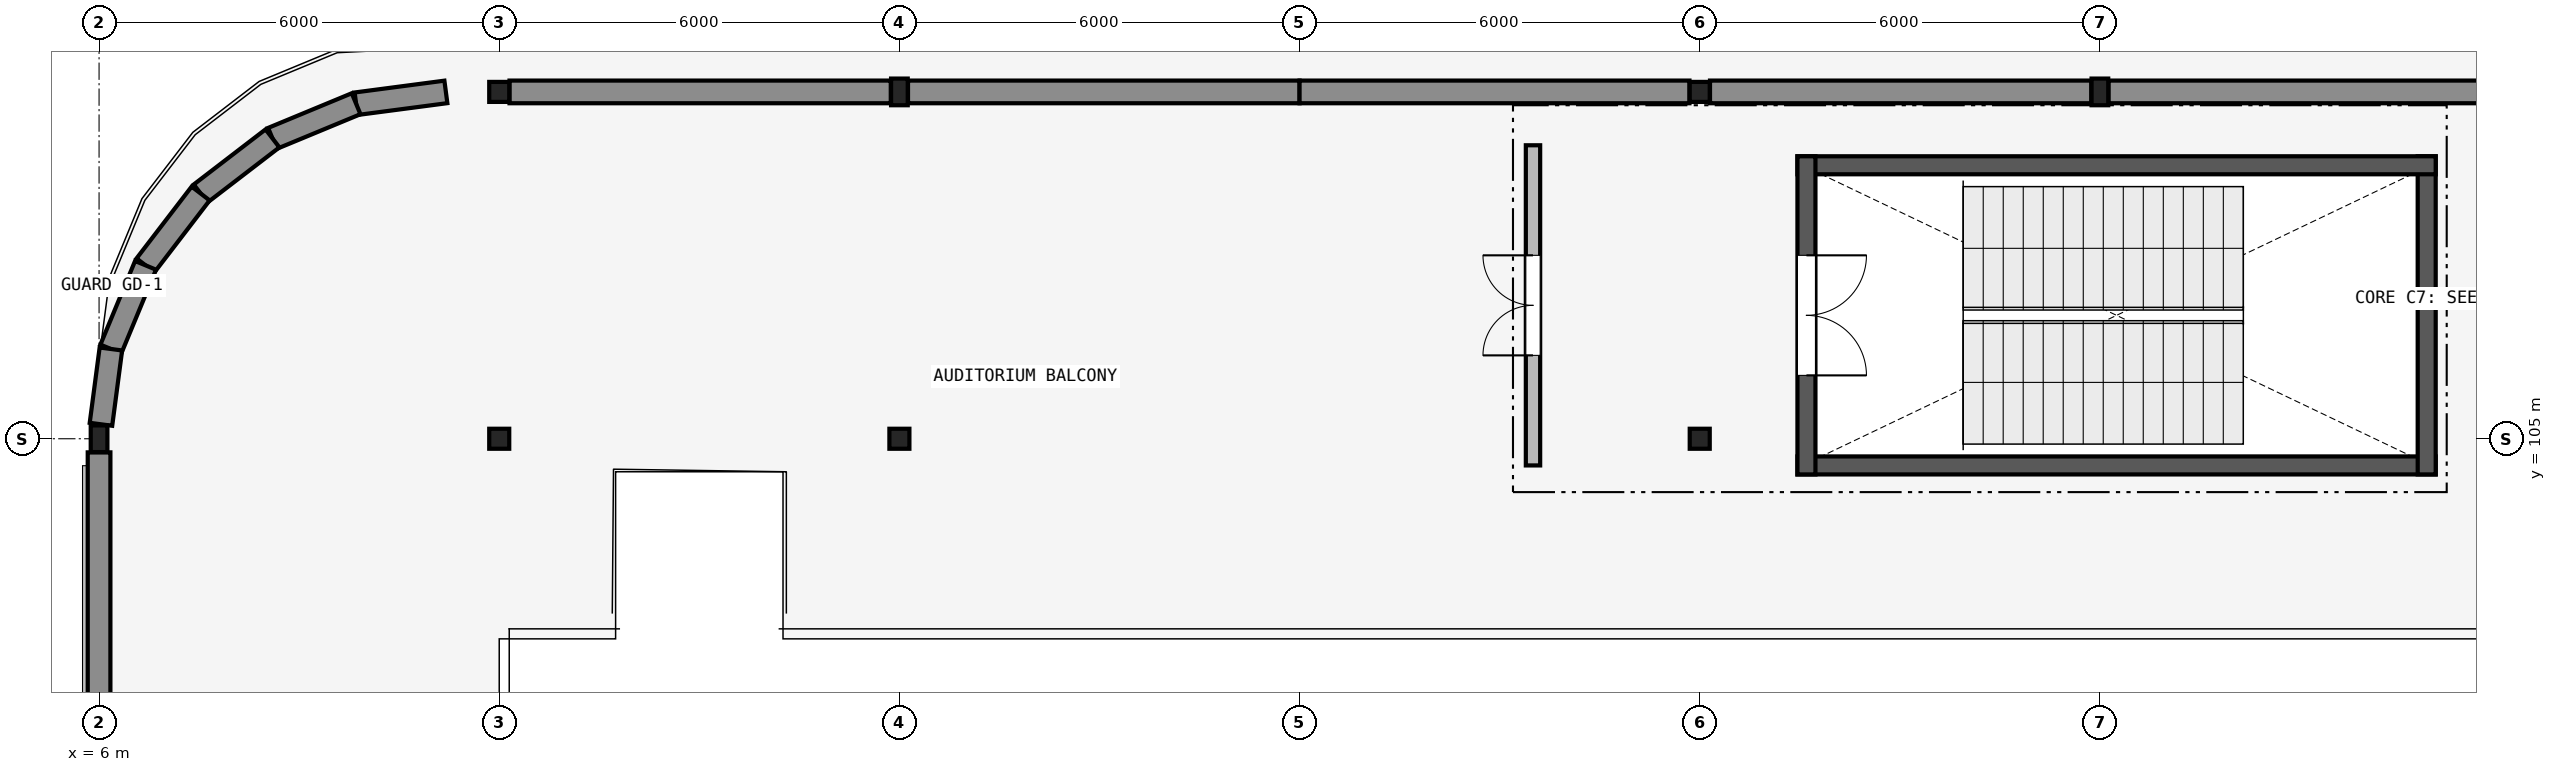
"""IFC4 building model, lengths in metres.
Left out: names, types, materials, properties, quantities, classifications, styles, units other than length and angle.
Written with IfcOpenShell. Run it as: python <this file> out.ifc"""

import sys

from ifc_helpers import new_model, si_unit, direction, frame, frame_2d, origin, origin_2d, place, context, subcontext, project, spatial, rectangle, hollow_rectangle, i_section, extrude, element, fill, save


model = new_model("IFC4")
c1 = context("Model", 3, precision=1e-05, world=origin(), true_north=direction((0.0, 1.0)))
c2 = subcontext(c1, "Body", "Model", "MODEL_VIEW")
j1 = project(units=[si_unit("LENGTHUNIT", "METRE"), si_unit("PLANEANGLEUNIT", "RADIAN")], contexts=[c1])
p1 = place(None, origin())
s1 = spatial("IfcSite", under=j1, at=p1, CompositionType="ELEMENT")
p2 = place(p1, origin())
s2 = spatial("IfcBuilding", under=s1, at=p2, CompositionType="ELEMENT")
p3 = place(p2, frame((0.0, 0.0, 4.8)))
s3 = spatial("IfcBuildingStorey", under=s2, at=p3, CompositionType="ELEMENT", Elevation=4.8)
p4 = place(p3, frame((6.0, 105.0, 0.0), z_axis=(0.0, 0.0, 1.0), x_axis=(1.0, 0.0, 0.0)))
e1 = element("IfcColumn", 1, at=p4, inside=s3, PredefinedType="COLUMN", context=c2, shape_type="SweptSolid", body=[
    extrude(i_section(OverallWidth=0.25, OverallDepth=0.4, WebThickness=0.01, FlangeThickness=0.013, FilletRadius=0.014, at=origin_2d()), origin(), (0.0, 0.0, 1.0), 4.5),
])
for number, where, z_axis, x_axis in (
    (2, (12.0, 105.0, 0.0), (0.0, 0.0, 1.0), (1.0, 0.0, 0.0)),
    (3, (12.0, 110.2, 0.0), (0.0, 0.0, 1.0), (1.0, 0.0, 0.0)),
    (4, (18.0, 105.0, 0.0), (0.0, 0.0, 1.0), (1.0, 0.0, 0.0)),
):
    element("IfcColumn", number, at=place(p3, frame(where, z_axis=z_axis, x_axis=x_axis)), inside=s3, PredefinedType="COLUMN", context=c2, shape_type="SweptSolid", body=[
        extrude(hollow_rectangle(XDim=0.3, YDim=0.3, WallThickness=0.016, InnerFilletRadius=0.016, OuterFilletRadius=0.032, at=origin_2d()), origin(), (0.0, 0.0, 1.0), 4.5),
    ])
p5 = place(p3, frame((18.0, 110.2, 0.0), z_axis=(0.0, 0.0, 1.0), x_axis=(1.0, 0.0, 0.0)))
e5 = element("IfcColumn", 5, at=p5, inside=s3, PredefinedType="COLUMN", context=c2, shape_type="SweptSolid", body=[
    extrude(i_section(OverallWidth=0.25, OverallDepth=0.4, WebThickness=0.01, FlangeThickness=0.013, FilletRadius=0.014, at=origin_2d()), origin(), (0.0, 0.0, 1.0), 4.5),
])
for number, where, z_axis, x_axis in (
    (6, (30.0, 105.0, 0.0), (0.0, 0.0, 1.0), (1.0, 0.0, 0.0)),
    (7, (30.0, 110.2, 0.0), (0.0, 0.0, 1.0), (1.0, 0.0, 0.0)),
):
    element("IfcColumn", number, at=place(p3, frame(where, z_axis=z_axis, x_axis=x_axis)), inside=s3, PredefinedType="COLUMN", context=c2, shape_type="SweptSolid", body=[
        extrude(hollow_rectangle(XDim=0.3, YDim=0.3, WallThickness=0.016, InnerFilletRadius=0.016, OuterFilletRadius=0.032, at=origin_2d()), origin(), (0.0, 0.0, 1.0), 4.5),
    ])
p6 = place(p3, frame((36.0, 110.2, 0.0), z_axis=(0.0, 0.0, 1.0), x_axis=(1.0, 0.0, 0.0)))
e8 = element("IfcColumn", 8, at=p6, inside=s3, PredefinedType="COLUMN", context=c2, shape_type="SweptSolid", body=[
    extrude(i_section(OverallWidth=0.25, OverallDepth=0.4, WebThickness=0.01, FlangeThickness=0.013, FilletRadius=0.014, at=origin_2d()), origin(), (0.0, 0.0, 1.0), 4.5),
])
p7 = place(p3, frame((6.0, 99.154, 0.0), z_axis=(0.0, 0.0, 1.0), x_axis=(0.0, 1.0, 0.0)))
e9 = element("IfcWall", 9, at=p7, inside=s3, PredefinedType="SOLIDWALL", context=c2, shape_type="SweptSolid", body=[
    extrude(rectangle(XDim=5.642, YDim=0.34, at=frame_2d((2.821, 0.0))), origin(), (0.0, 0.0, 1.0), 3.64),
])
p8 = place(p3, frame((12.154, 110.2, 0.0), z_axis=(0.0, 0.0, 1.0), x_axis=(1.0, 0.0, 0.0)))
e10 = element("IfcWall", 10, at=p8, inside=s3, PredefinedType="SOLIDWALL", context=c2, shape_type="SweptSolid", body=[
    extrude(rectangle(XDim=5.717, YDim=0.34, at=frame_2d((2.858, 0.0))), origin(), (0.0, 0.0, 1.0), 3.39),
])
p9 = place(p3, frame((18.129, 110.2, 0.0), z_axis=(0.0, 0.0, 1.0), x_axis=(1.0, 0.0, 0.0)))
e11 = element("IfcWall", 11, at=p9, inside=s3, PredefinedType="SOLIDWALL", context=c2, shape_type="SweptSolid", body=[
    extrude(rectangle(XDim=5.871, YDim=0.34, at=frame_2d((2.936, 0.0))), origin(), (0.0, 0.0, 1.0), 3.39),
])
p10 = place(p3, frame((24.0, 110.2, 0.0), z_axis=(0.0, 0.0, 1.0), x_axis=(1.0, 0.0, 0.0)))
e12 = element("IfcWall", 12, at=p10, inside=s3, PredefinedType="SOLIDWALL", context=c2, shape_type="SweptSolid", body=[
    extrude(rectangle(XDim=5.846, YDim=0.34, at=frame_2d((2.923, 0.0))), origin(), (0.0, 0.0, 1.0), 3.39),
])
p11 = place(p3, frame((30.154, 110.2, 0.0), z_axis=(0.0, 0.0, 1.0), x_axis=(1.0, 0.0, 0.0)))
e13 = element("IfcWall", 13, at=p11, inside=s3, PredefinedType="SOLIDWALL", context=c2, shape_type="SweptSolid", body=[
    extrude(rectangle(XDim=5.717, YDim=0.34, at=frame_2d((2.858, 0.0))), origin(), (0.0, 0.0, 1.0), 3.39),
])
p12 = place(p3, frame((36.129, 110.2, 0.0), z_axis=(0.0, 0.0, 1.0), x_axis=(1.0, 0.0, 0.0)))
e14 = element("IfcWall", 14, at=p12, inside=s3, PredefinedType="SOLIDWALL", context=c2, shape_type="SweptSolid", body=[
    extrude(rectangle(XDim=5.717, YDim=0.34, at=frame_2d((2.858, 0.0))), origin(), (0.0, 0.0, 1.0), 3.84),
])
p13 = place(p3, frame((11.2, 110.2, 0.0), z_axis=(0.0, 0.0, 1.0), x_axis=(-0.991440211328, -0.130561507967, 0.0)))
e15 = element("IfcWall", 15, at=p13, inside=s3, PredefinedType="SOLIDWALL", context=c2, shape_type="SweptSolid", body=[
    extrude(rectangle(XDim=1.358, YDim=0.34, at=frame_2d((0.679, 0.0))), origin(), (0.0, 0.0, 1.0), 4.195),
])
p14 = place(p3, frame((9.854, 110.023, 0.0), z_axis=(0.0, 0.0, 1.0), x_axis=(-0.923905024937, -0.382621882407, 0.0)))
e16 = element("IfcWall", 16, at=p14, inside=s3, PredefinedType="SOLIDWALL", context=c2, shape_type="SweptSolid", body=[
    extrude(rectangle(XDim=1.357, YDim=0.34, at=frame_2d((0.679, 0.0))), origin(), (0.0, 0.0, 1.0), 4.195),
])
p15 = place(p3, frame((8.6, 109.503, 0.0), z_axis=(0.0, 0.0, 1.0), x_axis=(-0.793392131727, -0.60871087169, 0.0)))
e17 = element("IfcWall", 17, at=p15, inside=s3, PredefinedType="SOLIDWALL", context=c2, shape_type="SweptSolid", body=[
    extrude(rectangle(XDim=1.358, YDim=0.34, at=frame_2d((0.679, 0.0))), origin(), (0.0, 0.0, 1.0), 4.195),
])
for number, where, z_axis, x_axis in (
    (18, (7.523, 108.677, 0.0), (0.0, 0.0, 1.0), (-0.609, -0.793, 0.0)),
    (19, (6.697, 107.6, 0.0), (0.0, 0.0, 1.0), (-0.383, -0.924, 0.0)),
):
    element("IfcWall", number, at=place(p3, frame(where, z_axis=z_axis, x_axis=x_axis)), inside=s3, PredefinedType="SOLIDWALL", context=c2, shape_type="SweptSolid", body=[
        extrude(rectangle(XDim=1.357, YDim=0.34, at=frame_2d((0.679, 0.0))), origin(), (0.0, 0.0, 1.0), 4.195),
    ])
p16 = place(p3, frame((6.177, 106.346, 0.0), z_axis=(0.0, 0.0, 1.0), x_axis=(-0.130548780406, -0.991441887321, 0.0)))
e20 = element("IfcWall", 20, at=p16, inside=s3, PredefinedType="SOLIDWALL", context=c2, shape_type="SweptSolid", body=[
    extrude(rectangle(XDim=1.139, YDim=0.34, at=frame_2d((0.569, 0.0))), origin(), (0.0, 0.0, 1.0), 3.64),
])
p17 = place(p3, frame((31.465, 104.6, 0.0), z_axis=(0.0, 0.0, 1.0), x_axis=(1.0, 0.0, 0.0)))
e21 = element("IfcWall", 21, at=p17, inside=s3, PredefinedType="SHEAR", context=c2, shape_type="SweptSolid", body=[
    extrude(rectangle(XDim=9.57, YDim=0.27, at=frame_2d((4.785, 0.0))), origin(), (0.0, 0.0, 1.0), 4.36),
])
p18 = place(p3, frame((40.9, 104.465, 0.0), z_axis=(0.0, 0.0, 1.0), x_axis=(0.0, 1.0, 0.0)))
e22 = element("IfcWall", 22, at=p18, inside=s3, PredefinedType="SHEAR", context=c2, shape_type="SweptSolid", body=[
    extrude(rectangle(XDim=4.77, YDim=0.27, at=frame_2d((2.385, 0.0))), origin(), (0.0, 0.0, 1.0), 4.36),
])
p19 = place(p3, frame((41.035, 109.1, 0.0), z_axis=(0.0, 0.0, 1.0), x_axis=(-1.0, 0.0, 0.0)))
e23 = element("IfcWall", 23, at=p19, inside=s3, PredefinedType="SHEAR", context=c2, shape_type="SweptSolid", body=[
    extrude(rectangle(XDim=9.57, YDim=0.27, at=frame_2d((4.785, 0.0))), origin(), (0.0, 0.0, 1.0), 4.36),
])
p20 = place(p3, frame((31.6, 109.235, 0.0), z_axis=(0.0, 0.0, 1.0), x_axis=(0.0, -1.0, 0.0)))
e24 = element("IfcWall", 24, at=p20, inside=s3, PredefinedType="SHEAR", context=c2, shape_type="SweptSolid", body=[
    extrude(rectangle(XDim=4.77, YDim=0.27, at=frame_2d((2.385, 0.0))), origin(), (0.0, 0.0, 1.0), 4.36),
])
p21 = place(p20, frame((1.485, 0.0, 0.0)))
e25 = element("IfcOpeningElement", 25, at=p21, cuts=e24, PredefinedType="OPENING", context=c2, shape_type="SweptSolid", body=[
    extrude(rectangle(XDim=1.8, YDim=2.2, at=frame_2d((0.9, 1.1))), frame((0.0, 0.145, 0.0), z_axis=(0.0, -1.0, 0.0), x_axis=(1.0, 0.0, 0.0)), (0.0, 0.0, 1.0), 0.29),
])
p22 = place(p3, frame((27.5, 104.6, 0.0), z_axis=(0.0, 0.0, 1.0), x_axis=(0.0, 1.0, 0.0)))
e26 = element("IfcWall", 26, at=p22, inside=s3, PredefinedType="PARTITIONING", context=c2, shape_type="SweptSolid", body=[
    extrude(rectangle(XDim=4.8, YDim=0.215, at=frame_2d((2.4, 0.0))), origin(), (0.0, 0.0, 1.0), 3.39),
])
p23 = place(p22, frame((1.65, 0.0, 0.0)))
e27 = element("IfcOpeningElement", 27, at=p23, cuts=e26, PredefinedType="OPENING", context=c2, shape_type="SweptSolid", body=[
    extrude(rectangle(XDim=1.5, YDim=2.15, at=frame_2d((0.75, 1.075))), frame((0.0, 0.117, 0.0), z_axis=(0.0, -1.0, 0.0), x_axis=(1.0, 0.0, 0.0)), (0.0, 0.0, 1.0), 0.235),
])
p24 = place(p21, origin())
e28 = element("IfcDoor", 28, at=p24, inside=s3, OperationType="DOUBLE_DOOR_SINGLE_SWING", PredefinedType="DOOR", context=c2, shape_type="SweptSolid", body=[
    extrude(rectangle(XDim=1.8, YDim=2.2, at=frame_2d((0.9, 1.1))), frame((0.0, 0.025, 0.0), z_axis=(0.0, -1.0, 0.0), x_axis=(1.0, 0.0, 0.0)), (0.0, 0.0, 1.0), 0.05),
])
fill(e25, e28)
p25 = place(p23, origin())
e29 = element("IfcDoor", 29, at=p25, inside=s3, OperationType="DOUBLE_DOOR_SINGLE_SWING", PredefinedType="DOOR", context=c2, shape_type="SweptSolid", body=[
    extrude(rectangle(XDim=1.5, YDim=2.15, at=frame_2d((0.75, 1.075))), frame((0.0, 0.025, 0.0), z_axis=(0.0, -1.0, 0.0), x_axis=(1.0, 0.0, 0.0)), (0.0, 0.0, 1.0), 0.05),
])
fill(e27, e29)
save(model, sys.argv[1])
